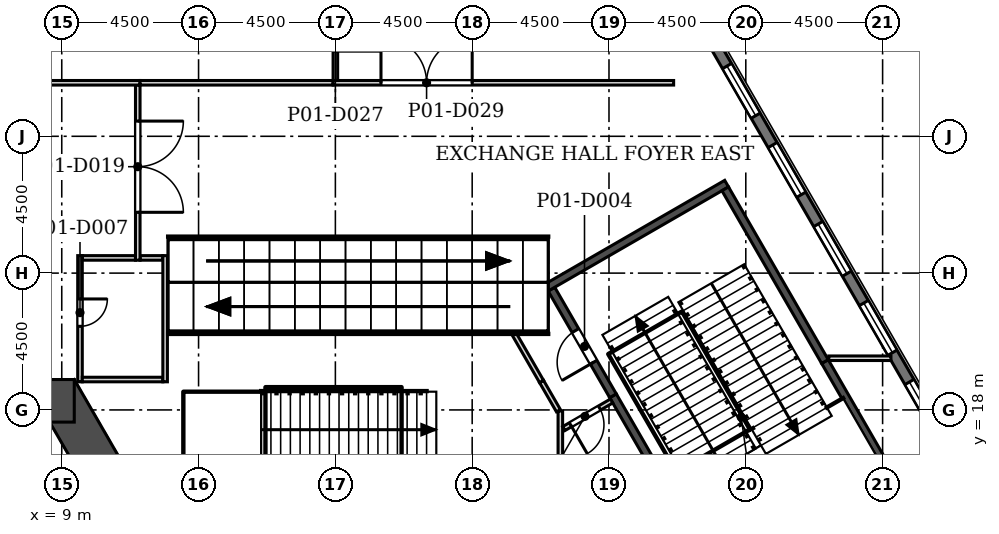
"""IFC4 building model, lengths in metres.
Left out: names, types, materials, properties, quantities, classifications, styles, units other than length and angle.
Written with IfcOpenShell. Run it as: python <this file> out.ifc"""

import sys

from ifc_helpers import new_model, si_unit, direction, frame, frame_2d, origin, place, context, subcontext, project, spatial, rectangle, extrude, element, fill, save


model = new_model("IFC4")
c1 = context("Model", 3, precision=1e-05, world=origin(), true_north=direction((0.0, 1.0)))
c2 = subcontext(c1, "Body", "Model", "MODEL_VIEW")
j1 = project(units=[si_unit("LENGTHUNIT", "METRE"), si_unit("PLANEANGLEUNIT", "RADIAN")], contexts=[c1])
p1 = place(None, origin())
s1 = spatial("IfcSite", under=j1, at=p1, CompositionType="ELEMENT")
p2 = place(p1, origin())
s2 = spatial("IfcBuilding", under=s1, at=p2, CompositionType="ELEMENT")
p3 = place(p2, frame((0.0, 0.0, 8.0)))
s3 = spatial("IfcBuildingStorey", under=s2, at=p3, CompositionType="ELEMENT", Elevation=8.0)
p4 = place(p3, frame((13.394, 10.703, 0.0), z_axis=(0.0, 0.0, 1.0), x_axis=(-0.50000187635, 0.866024320471, 0.0)))
e1 = element("IfcWall", 1, at=p4, inside=s3, PredefinedType="SHEAR", context=c2, shape_type="SweptSolid", body=[
    extrude(rectangle(XDim=9.177, YDim=1.4, at=frame_2d((4.588, 0.0))), origin(), (0.0, 0.0, 1.0), 6.0),
])
p5 = place(p3, frame((9.412, 18.3, 0.0), z_axis=(0.0, 0.0, 1.0), x_axis=(-1.0, 0.0, 0.0)))
e2 = element("IfcWall", 2, at=p5, inside=s3, PredefinedType="SHEAR", context=c2, shape_type="SweptSolid", body=[
    extrude(rectangle(XDim=18.823, YDim=1.4, at=frame_2d((9.412, 0.0))), origin(), (0.0, 0.0, 1.0), 6.0),
])
p6 = place(p5, frame((8.711, 0.0, 0.0)))
e3 = element("IfcOpeningElement", 3, at=p6, cuts=e2, PredefinedType="OPENING", context=c2, shape_type="SweptSolid", body=[
    extrude(rectangle(XDim=1.4, YDim=2.1, at=frame_2d((0.7, 1.05))), frame((0.0, 0.71, 0.0), z_axis=(0.0, -1.0, 0.0), x_axis=(1.0, 0.0, 0.0)), (0.0, 0.0, 1.0), 1.42),
])
p7 = place(p5, frame((11.412, 0.0, 0.0)))
e4 = element("IfcOpeningElement", 4, at=p7, cuts=e2, PredefinedType="OPENING", context=c2, shape_type="SweptSolid", body=[
    extrude(rectangle(XDim=6.0, YDim=2.4, at=frame_2d((3.0, 1.2))), frame((0.0, 0.71, 0.0), z_axis=(0.0, -1.0, 0.0), x_axis=(1.0, 0.0, 0.0)), (0.0, 0.0, 1.0), 1.42),
])
p8 = place(p5, frame((1.412, 0.0, 0.0)))
e5 = element("IfcOpeningElement", 5, at=p8, cuts=e2, PredefinedType="OPENING", context=c2, shape_type="SweptSolid", body=[
    extrude(rectangle(XDim=6.0, YDim=2.4, at=frame_2d((3.0, 1.2))), frame((0.0, 0.71, 0.0), z_axis=(0.0, -1.0, 0.0), x_axis=(1.0, 0.0, 0.0)), (0.0, 0.0, 1.0), 1.42),
])
p9 = place(p3, frame((38.382, 16.32, 0.0), z_axis=(0.0, 0.0, 1.0), x_axis=(-0.500003967864, 0.866023112925, 0.0)))
e6 = element("IfcWall", 6, at=p9, inside=s3, PredefinedType="SOLIDWALL", context=c2, shape_type="SweptSolid", body=[
    extrude(rectangle(XDim=16.115, YDim=0.34, at=frame_2d((8.058, 0.0))), origin(), (0.0, 0.0, 1.0), 5.7),
])
p10 = place(p9, frame((1.115, 0.0, 0.9)))
e7 = element("IfcOpeningElement", 7, at=p10, cuts=e6, PredefinedType="OPENING", context=c2, shape_type="SweptSolid", body=[
    extrude(rectangle(XDim=1.885, YDim=3.5, at=frame_2d((0.942, 1.75))), frame((0.0, 0.18, 0.0), z_axis=(0.0, -1.0, 0.0), x_axis=(1.0, 0.0, 0.0)), (0.0, 0.0, 1.0), 0.36),
])
p11 = place(p9, frame((4.115, 0.0, 0.9)))
e8 = element("IfcOpeningElement", 8, at=p11, cuts=e6, PredefinedType="OPENING", context=c2, shape_type="SweptSolid", body=[
    extrude(rectangle(XDim=1.885, YDim=3.5, at=frame_2d((0.942, 1.75))), frame((0.0, 0.18, 0.0), z_axis=(0.0, -1.0, 0.0), x_axis=(1.0, 0.0, 0.0)), (0.0, 0.0, 1.0), 0.36),
])
p12 = place(p9, frame((7.115, 0.0, 0.9)))
e9 = element("IfcOpeningElement", 9, at=p12, cuts=e6, PredefinedType="OPENING", context=c2, shape_type="SweptSolid", body=[
    extrude(rectangle(XDim=1.885, YDim=3.5, at=frame_2d((0.942, 1.75))), frame((0.0, 0.18, 0.0), z_axis=(0.0, -1.0, 0.0), x_axis=(1.0, 0.0, 0.0)), (0.0, 0.0, 1.0), 0.36),
])
p13 = place(p9, frame((10.115, 0.0, 0.9)))
e10 = element("IfcOpeningElement", 10, at=p13, cuts=e6, PredefinedType="OPENING", context=c2, shape_type="SweptSolid", body=[
    extrude(rectangle(XDim=1.885, YDim=3.5, at=frame_2d((0.942, 1.75))), frame((0.0, 0.18, 0.0), z_axis=(0.0, -1.0, 0.0), x_axis=(1.0, 0.0, 0.0)), (0.0, 0.0, 1.0), 0.36),
])
p14 = place(p9, frame((13.115, 0.0, 0.9)))
e11 = element("IfcOpeningElement", 11, at=p14, cuts=e6, PredefinedType="OPENING", context=c2, shape_type="SweptSolid", body=[
    extrude(rectangle(XDim=1.885, YDim=3.5, at=frame_2d((0.942, 1.75))), frame((0.0, 0.18, 0.0), z_axis=(0.0, -1.0, 0.0), x_axis=(1.0, 0.0, 0.0)), (0.0, 0.0, 1.0), 0.36),
])
p15 = place(p3, frame((30.907, 11.927, 0.0), z_axis=(0.0, 0.0, 1.0), x_axis=(-0.499985572004, 0.866033733632, 0.0)))
e12 = element("IfcWall", 12, at=p15, inside=s3, PredefinedType="SOLIDWALL", context=c2, shape_type="SweptSolid", body=[
    extrude(rectangle(XDim=7.55, YDim=0.25, at=frame_2d((3.775, 0.0))), origin(), (0.0, 0.0, 1.0), 5.7),
])
p16 = place(p3, frame((25.4, 17.965, 0.0), z_axis=(0.0, 0.0, 1.0), x_axis=(0.0, -1.0, 0.0)))
e13 = element("IfcWall", 13, at=p16, inside=s3, PredefinedType="PARTITIONING", context=c2, shape_type="SweptSolid", body=[
    extrude(rectangle(XDim=5.89, YDim=0.15, at=frame_2d((2.945, 0.0))), origin(), (0.0, 0.0, 1.0), 5.7),
])
p17 = place(p16, frame((2.465, 0.0, 0.0)))
e14 = element("IfcOpeningElement", 14, at=p17, cuts=e13, PredefinedType="OPENING", context=c2, shape_type="SweptSolid", body=[
    extrude(rectangle(XDim=1.0, YDim=2.1, at=frame_2d((0.5, 1.05))), frame((0.0, 0.085, 0.0), z_axis=(0.0, -1.0, 0.0), x_axis=(1.0, 0.0, 0.0)), (0.0, 0.0, 1.0), 0.17),
])
p18 = place(p3, frame((25.337, 17.975, 0.0), z_axis=(0.0, 0.0, 1.0), x_axis=(-0.50011622646, 0.865958290007, 0.0)))
e15 = element("IfcWall", 15, at=p18, inside=s3, PredefinedType="PARTITIONING", context=c2, shape_type="SweptSolid", body=[
    extrude(rectangle(XDim=1.109, YDim=0.15, at=frame_2d((0.555, 0.0))), origin(), (0.0, 0.0, 1.0), 5.7),
])
p19 = place(p3, frame((27.087, 18.294, 0.0), z_axis=(0.0, 0.0, 1.0), x_axis=(-0.866100518934, -0.499869874169, 0.0)))
e16 = element("IfcWall", 16, at=p19, inside=s3, PredefinedType="PARTITIONING", context=c2, shape_type="SweptSolid", body=[
    extrude(rectangle(XDim=1.816, YDim=0.15, at=frame_2d((0.908, 0.0))), origin(), (0.0, 0.0, 1.0), 5.7),
])
p20 = place(p19, frame((0.461, 0.0, 0.0)))
e17 = element("IfcOpeningElement", 17, at=p20, cuts=e16, PredefinedType="OPENING", context=c2, shape_type="SweptSolid", body=[
    extrude(rectangle(XDim=1.1, YDim=2.1, at=frame_2d((0.55, 1.05))), frame((0.0, 0.085, 0.0), z_axis=(0.0, -1.0, 0.0), x_axis=(1.0, 0.0, 0.0)), (0.0, 0.0, 1.0), 0.17),
])
p21 = place(p3, frame((27.132, 18.465, 0.0), z_axis=(0.0, 0.0, 1.0), x_axis=(-0.499971214291, 0.866042022584, 0.0)))
e18 = element("IfcWall", 18, at=p21, inside=s3, PredefinedType="SOLIDWALL", context=c2, shape_type="SweptSolid", body=[
    extrude(rectangle(XDim=4.05, YDim=0.25, at=frame_2d((2.025, 0.0))), origin(), (0.0, 0.0, 1.0), 5.7),
])
p22 = place(p21, frame((1.275, 0.0, 0.0)))
e19 = element("IfcOpeningElement", 19, at=p22, cuts=e18, PredefinedType="OPENING", context=c2, shape_type="SweptSolid", body=[
    extrude(rectangle(XDim=1.2, YDim=2.1, at=frame_2d((0.6, 1.05))), frame((0.0, 0.135, 0.0), z_axis=(0.0, -1.0, 0.0), x_axis=(1.0, 0.0, 0.0)), (0.0, 0.0, 1.0), 0.27),
])
p23 = place(p3, frame((9.6, 18.925, 0.0), z_axis=(0.0, 0.0, 1.0), x_axis=(0.0, 1.0, 0.0)))
e20 = element("IfcWall", 20, at=p23, inside=s3, PredefinedType="PARTITIONING", context=c2, shape_type="SweptSolid", body=[
    extrude(rectangle(XDim=4.15, YDim=0.15, at=frame_2d((2.075, 0.0))), origin(), (0.0, 0.0, 1.0), 5.7),
])
p24 = place(p23, frame((1.825, 0.0, 0.0)))
e21 = element("IfcOpeningElement", 21, at=p24, cuts=e20, PredefinedType="OPENING", context=c2, shape_type="SweptSolid", body=[
    extrude(rectangle(XDim=0.9, YDim=2.1, at=frame_2d((0.45, 1.05))), frame((0.0, 0.085, 0.0), z_axis=(0.0, -1.0, 0.0), x_axis=(1.0, 0.0, 0.0)), (0.0, 0.0, 1.0), 0.17),
])
p25 = place(p3, frame((24.782, 18.935, 0.0), z_axis=(0.0, 0.0, 1.0), x_axis=(-0.499962016178, 0.866047332643, 0.0)))
e22 = element("IfcWall", 22, at=p25, inside=s3, PredefinedType="PARTITIONING", context=c2, shape_type="SweptSolid", body=[
    extrude(rectangle(XDim=1.882, YDim=0.15, at=frame_2d((0.941, 0.0))), origin(), (0.0, 0.0, 1.0), 5.7),
])
p26 = place(p3, frame((12.325, 19.0, 0.0), z_axis=(0.0, 0.0, 1.0), x_axis=(-1.0, 0.0, 0.0)))
e23 = element("IfcWall", 23, at=p26, inside=s3, PredefinedType="PARTITIONING", context=c2, shape_type="SweptSolid", body=[
    extrude(rectangle(XDim=2.65, YDim=0.15, at=frame_2d((1.325, 0.0))), origin(), (0.0, 0.0, 1.0), 5.7),
])
p27 = place(p3, frame((34.103, 19.592, 0.0), z_axis=(0.0, 0.0, 1.0), x_axis=(0.499981253467, -0.86603622683, 0.0)))
e24 = element("IfcWall", 24, at=p27, inside=s3, PredefinedType="SOLIDWALL", context=c2, shape_type="SweptSolid", body=[
    extrude(rectangle(XDim=4.791, YDim=0.25, at=frame_2d((2.396, 0.0))), origin(), (0.0, 0.0, 1.0), 5.7),
])
p28 = place(p3, frame((34.229, 19.7, 0.0), z_axis=(0.0, 0.0, 1.0), x_axis=(1.0, 0.0, 0.0)))
e25 = element("IfcWall", 25, at=p28, inside=s3, PredefinedType="PARTITIONING", context=c2, shape_type="SweptSolid", body=[
    extrude(rectangle(XDim=2.044, YDim=0.15, at=frame_2d((1.022, 0.0))), origin(), (0.0, 0.0, 1.0), 5.7),
])
p29 = place(p3, frame((24.936, 22.018, 0.0), z_axis=(0.0, 0.0, 1.0), x_axis=(0.866050272892, 0.499956922968, 0.0)))
e26 = element("IfcWall", 26, at=p29, inside=s3, PredefinedType="SOLIDWALL", context=c2, shape_type="SweptSolid", body=[
    extrude(rectangle(XDim=6.85, YDim=0.25, at=frame_2d((3.425, 0.0))), origin(), (0.0, 0.0, 1.0), 5.7),
])
p30 = place(p3, frame((9.675, 23.0, 0.0), z_axis=(0.0, 0.0, 1.0), x_axis=(1.0, 0.0, 0.0)))
e27 = element("IfcWall", 27, at=p30, inside=s3, PredefinedType="PARTITIONING", context=c2, shape_type="SweptSolid", body=[
    extrude(rectangle(XDim=1.75, YDim=0.15, at=frame_2d((0.875, 0.0))), origin(), (0.0, 0.0, 1.0), 5.7),
])
p31 = place(p3, frame((11.575, 23.0, 0.0), z_axis=(0.0, 0.0, 1.0), x_axis=(1.0, 0.0, 0.0)))
e28 = element("IfcWall", 28, at=p31, inside=s3, PredefinedType="PARTITIONING", context=c2, shape_type="SweptSolid", body=[
    extrude(rectangle(XDim=0.75, YDim=0.15, at=frame_2d((0.375, 0.0))), origin(), (0.0, 0.0, 1.0), 5.7),
])
p32 = place(p3, frame((12.4, 23.075, 0.0), z_axis=(0.0, 0.0, 1.0), x_axis=(0.0, -1.0, 0.0)))
e29 = element("IfcWall", 29, at=p32, inside=s3, PredefinedType="PARTITIONING", context=c2, shape_type="SweptSolid", body=[
    extrude(rectangle(XDim=4.15, YDim=0.15, at=frame_2d((2.075, 0.0))), origin(), (0.0, 0.0, 1.0), 5.7),
])
p33 = place(p3, frame((30.823, 25.272, 0.0), z_axis=(0.0, 0.0, 1.0), x_axis=(0.499978056798, -0.866038072327, 0.0)))
e30 = element("IfcWall", 30, at=p33, inside=s3, PredefinedType="SOLIDWALL", context=c2, shape_type="SweptSolid", body=[
    extrude(rectangle(XDim=6.559, YDim=0.25, at=frame_2d((3.28, 0.0))), origin(), (0.0, 0.0, 1.0), 5.7),
])
p34 = place(p3, frame((11.5, 28.685, 0.0), z_axis=(0.0, 0.0, 1.0), x_axis=(0.0, -1.0, 0.0)))
e31 = element("IfcWall", 31, at=p34, inside=s3, PredefinedType="PARTITIONING", context=c2, shape_type="SweptSolid", body=[
    extrude(rectangle(XDim=5.76, YDim=0.15, at=frame_2d((2.88, 0.0))), origin(), (0.0, 0.0, 1.0), 5.7),
])
p35 = place(p34, frame((1.185, 0.0, 0.0)))
e32 = element("IfcOpeningElement", 32, at=p35, cuts=e31, PredefinedType="OPENING", context=c2, shape_type="SweptSolid", body=[
    extrude(rectangle(XDim=3.0, YDim=2.4, at=frame_2d((1.5, 1.2))), frame((0.0, 0.085, 0.0), z_axis=(0.0, -1.0, 0.0), x_axis=(1.0, 0.0, 0.0)), (0.0, 0.0, 1.0), 0.17),
])
p36 = place(p3, frame((4.105, 28.76, 0.0), z_axis=(0.0, 0.0, 1.0), x_axis=(1.0, 0.0, 0.0)))
e33 = element("IfcWall", 33, at=p36, inside=s3, PredefinedType="PARTITIONING", context=c2, shape_type="SweptSolid", body=[
    extrude(rectangle(XDim=7.47, YDim=0.15, at=frame_2d((3.735, 0.0))), origin(), (0.0, 0.0, 1.0), 5.7),
])
p37 = place(p36, frame((0.395, 0.0, 0.0)))
e34 = element("IfcOpeningElement", 34, at=p37, cuts=e33, PredefinedType="OPENING", context=c2, shape_type="SweptSolid", body=[
    extrude(rectangle(XDim=3.0, YDim=2.4, at=frame_2d((1.5, 1.2))), frame((0.0, 0.085, 0.0), z_axis=(0.0, -1.0, 0.0), x_axis=(1.0, 0.0, 0.0)), (0.0, 0.0, 1.0), 0.17),
])
p38 = place(p3, frame((11.575, 28.76, 0.0), z_axis=(0.0, 0.0, 1.0), x_axis=(1.0, 0.0, 0.0)))
e35 = element("IfcWall", 35, at=p38, inside=s3, PredefinedType="PARTITIONING", context=c2, shape_type="SweptSolid", body=[
    extrude(rectangle(XDim=6.35, YDim=0.15, at=frame_2d((3.175, 0.0))), origin(), (0.0, 0.0, 1.0), 5.7),
])
p39 = place(p3, frame((17.925, 28.76, 0.0), z_axis=(0.0, 0.0, 1.0), x_axis=(1.0, 0.0, 0.0)))
e36 = element("IfcWall", 36, at=p39, inside=s3, PredefinedType="PARTITIONING", context=c2, shape_type="SweptSolid", body=[
    extrude(rectangle(XDim=11.201, YDim=0.15, at=frame_2d((5.601, 0.0))), origin(), (0.0, 0.0, 1.0), 5.7),
])
p40 = place(p39, frame((1.575, 0.0, 0.0)))
e37 = element("IfcOpeningElement", 37, at=p40, cuts=e36, PredefinedType="OPENING", context=c2, shape_type="SweptSolid", body=[
    extrude(rectangle(XDim=3.0, YDim=2.4, at=frame_2d((1.5, 1.2))), frame((0.0, 0.085, 0.0), z_axis=(0.0, -1.0, 0.0), x_axis=(1.0, 0.0, 0.0)), (0.0, 0.0, 1.0), 0.17),
])
p41 = place(p3, frame((18.0, 28.835, 0.0), z_axis=(0.0, 0.0, 1.0), x_axis=(0.0, 1.0, 0.0)))
e38 = element("IfcWall", 38, at=p41, inside=s3, PredefinedType="PARTITIONING", context=c2, shape_type="SweptSolid", body=[
    extrude(rectangle(XDim=5.35, YDim=0.15, at=frame_2d((2.675, 0.0))), origin(), (0.0, 0.0, 1.0), 5.7),
])
p42 = place(p41, frame((0.965, 0.0, 0.0)))
e39 = element("IfcOpeningElement", 39, at=p42, cuts=e38, PredefinedType="OPENING", context=c2, shape_type="SweptSolid", body=[
    extrude(rectangle(XDim=3.0, YDim=2.4, at=frame_2d((1.5, 1.2))), frame((0.0, 0.085, 0.0), z_axis=(0.0, -1.0, 0.0), x_axis=(1.0, 0.0, 0.0)), (0.0, 0.0, 1.0), 0.17),
])
p43 = place(p3, frame((13.125, 13.45, 0.0), z_axis=(0.0, 0.0, 1.0), x_axis=(0.0, 1.0, 0.0)))
e40 = element("IfcWall", 40, at=p43, inside=s3, PredefinedType="SOLIDWALL", context=c2, shape_type="SweptSolid", body=[
    extrude(rectangle(XDim=5.1, YDim=0.25, at=frame_2d((2.55, 0.0))), origin(), (0.0, 0.0, 1.0), 5.7),
])
p44 = place(p3, frame((13.125, 18.475, 0.0), z_axis=(0.0, 0.0, 1.0), x_axis=(1.0, 0.0, 0.0)))
e41 = element("IfcWall", 41, at=p44, inside=s3, PredefinedType="SOLIDWALL", context=c2, shape_type="SweptSolid", body=[
    extrude(rectangle(XDim=2.31, YDim=0.25, at=frame_2d((1.155, 0.0))), origin(), (0.0, 0.0, 1.0), 5.7),
])
p45 = place(p10, origin())
e42 = element("IfcWindow", 42, at=p45, inside=s3, PartitioningType="SINGLE_PANEL", PredefinedType="WINDOW", context=c2, shape_type="SweptSolid", body=[
    extrude(rectangle(XDim=1.885, YDim=3.5, at=frame_2d((0.942, 1.75))), frame((0.0, 0.11, 0.0), z_axis=(0.0, -1.0, 0.0), x_axis=(1.0, 0.0, 0.0)), (0.0, 0.0, 1.0), 0.06),
])
fill(e7, e42)
p46 = place(p11, origin())
e43 = element("IfcWindow", 43, at=p46, inside=s3, PartitioningType="SINGLE_PANEL", PredefinedType="WINDOW", context=c2, shape_type="SweptSolid", body=[
    extrude(rectangle(XDim=1.885, YDim=3.5, at=frame_2d((0.942, 1.75))), frame((0.0, 0.11, 0.0), z_axis=(0.0, -1.0, 0.0), x_axis=(1.0, 0.0, 0.0)), (0.0, 0.0, 1.0), 0.06),
])
fill(e8, e43)
p47 = place(p12, origin())
e44 = element("IfcWindow", 44, at=p47, inside=s3, PartitioningType="SINGLE_PANEL", PredefinedType="WINDOW", context=c2, shape_type="SweptSolid", body=[
    extrude(rectangle(XDim=1.885, YDim=3.5, at=frame_2d((0.942, 1.75))), frame((0.0, 0.11, 0.0), z_axis=(0.0, -1.0, 0.0), x_axis=(1.0, 0.0, 0.0)), (0.0, 0.0, 1.0), 0.06),
])
fill(e9, e44)
p48 = place(p13, origin())
e45 = element("IfcWindow", 45, at=p48, inside=s3, PartitioningType="SINGLE_PANEL", PredefinedType="WINDOW", context=c2, shape_type="SweptSolid", body=[
    extrude(rectangle(XDim=1.885, YDim=3.5, at=frame_2d((0.942, 1.75))), frame((0.0, 0.11, 0.0), z_axis=(0.0, -1.0, 0.0), x_axis=(1.0, 0.0, 0.0)), (0.0, 0.0, 1.0), 0.06),
])
fill(e10, e45)
p49 = place(p14, origin())
e46 = element("IfcWindow", 46, at=p49, inside=s3, PartitioningType="SINGLE_PANEL", PredefinedType="WINDOW", context=c2, shape_type="SweptSolid", body=[
    extrude(rectangle(XDim=1.885, YDim=3.5, at=frame_2d((0.942, 1.75))), frame((0.0, 0.11, 0.0), z_axis=(0.0, -1.0, 0.0), x_axis=(1.0, 0.0, 0.0)), (0.0, 0.0, 1.0), 0.06),
])
fill(e11, e46)
p50 = place(p22, origin())
e47 = element("IfcDoor", 47, at=p50, inside=s3, OperationType="SINGLE_SWING_LEFT", PredefinedType="DOOR", context=c2, shape_type="SweptSolid", body=[
    extrude(rectangle(XDim=1.2, YDim=2.1, at=frame_2d((0.6, 1.05))), frame((0.0, 0.025, 0.0), z_axis=(0.0, -1.0, 0.0), x_axis=(1.0, 0.0, 0.0)), (0.0, 0.0, 1.0), 0.05),
])
fill(e19, e47)
p51 = place(p20, origin())
e48 = element("IfcDoor", 48, at=p51, inside=s3, OperationType="SINGLE_SWING_RIGHT", PredefinedType="DOOR", context=c2, shape_type="SweptSolid", body=[
    extrude(rectangle(XDim=1.1, YDim=2.1, at=frame_2d((0.55, 1.05))), frame((0.0, 0.025, 0.0), z_axis=(0.0, -1.0, 0.0), x_axis=(1.0, 0.0, 0.0)), (0.0, 0.0, 1.0), 0.05),
])
fill(e17, e48)
p52 = place(p24, frame((0.9, 0.0, 0.0), z_axis=(0.0, 0.0, 1.0), x_axis=(-1.0, 0.0, 0.0)))
e49 = element("IfcDoor", 49, at=p52, inside=s3, OperationType="SINGLE_SWING_LEFT", PredefinedType="DOOR", context=c2, shape_type="SweptSolid", body=[
    extrude(rectangle(XDim=0.9, YDim=2.1, at=frame_2d((0.45, 1.05))), frame((0.0, 0.025, 0.0), z_axis=(0.0, -1.0, 0.0), x_axis=(1.0, 0.0, 0.0)), (0.0, 0.0, 1.0), 0.05),
])
fill(e21, e49)
p53 = place(p35, origin())
e50 = element("IfcDoor", 50, at=p53, inside=s3, OperationType="DOUBLE_DOOR_SINGLE_SWING", PredefinedType="DOOR", context=c2, shape_type="SweptSolid", body=[
    extrude(rectangle(XDim=3.0, YDim=2.4, at=frame_2d((1.5, 1.2))), frame((0.0, 0.025, 0.0), z_axis=(0.0, -1.0, 0.0), x_axis=(1.0, 0.0, 0.0)), (0.0, 0.0, 1.0), 0.05),
])
fill(e32, e50)
p54 = place(p40, origin())
e51 = element("IfcDoor", 51, at=p54, inside=s3, OperationType="DOUBLE_DOOR_SINGLE_SWING", PredefinedType="DOOR", context=c2, shape_type="SweptSolid", body=[
    extrude(rectangle(XDim=3.0, YDim=2.4, at=frame_2d((1.5, 1.2))), frame((0.0, 0.025, 0.0), z_axis=(0.0, -1.0, 0.0), x_axis=(1.0, 0.0, 0.0)), (0.0, 0.0, 1.0), 0.05),
])
fill(e37, e51)
save(model, sys.argv[1])
